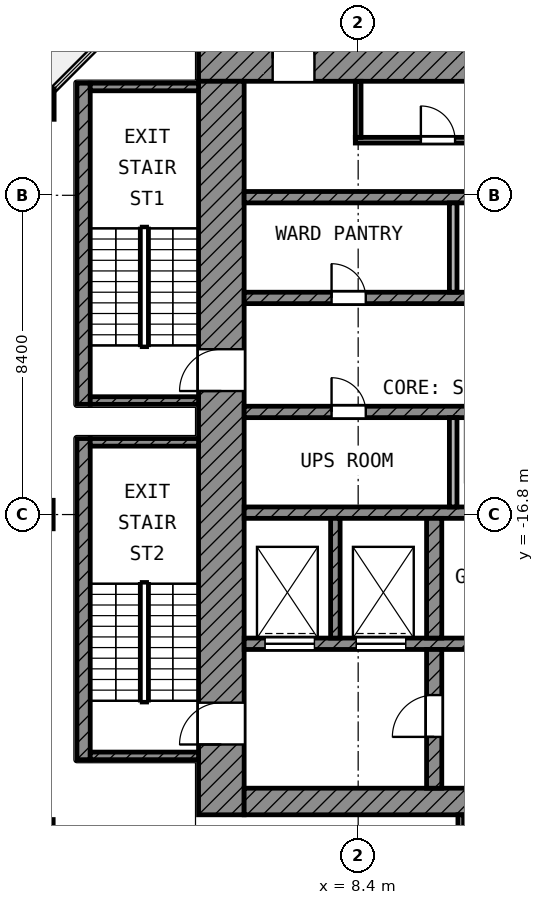
"""IFC4 building model, lengths in metres.
Left out: names, types, materials, properties, quantities, classifications, styles, units other than length and angle.
Written with IfcOpenShell. Run it as: python <this file> out.ifc"""

import sys

from ifc_helpers import new_model, si_unit, direction, frame, frame_2d, origin, origin_2d, place, context, subcontext, project, spatial, rectangle, extrude, element, fill, save


model = new_model("IFC4")
c1 = context("Model", 3, precision=1e-05, world=origin(), true_north=direction((0.0, 1.0)))
c2 = subcontext(c1, "Body", "Model", "MODEL_VIEW")
j1 = project(units=[si_unit("LENGTHUNIT", "METRE"), si_unit("PLANEANGLEUNIT", "RADIAN")], contexts=[c1])
p1 = place(None, origin())
s1 = spatial("IfcSite", under=j1, at=p1, CompositionType="ELEMENT")
p2 = place(p1, origin())
s2 = spatial("IfcBuilding", under=s1, at=p2, CompositionType="ELEMENT")
p3 = place(p2, frame((0.0, 0.0, 294.4)))
s3 = spatial("IfcBuildingStorey", under=s2, at=p3, CompositionType="ELEMENT", Elevation=294.4)
p4 = place(p3, frame((0.0, -6.0, 0.0), z_axis=(0.0, 0.0, 1.0), x_axis=(1.0, 0.0, 0.0)))
e1 = element("IfcColumn", 1, at=p4, inside=s3, PredefinedType="COLUMN", context=c2, shape_type="SweptSolid", body=[
    extrude(rectangle(XDim=0.8, YDim=0.8, at=origin_2d()), origin(), (0.0, 0.0, 1.0), 4.2),
])
for number, where, z_axis, x_axis in (
    (2, (0.0, -16.8, 0.0), (0.0, 0.0, 1.0), (1.0, 0.0, 0.0)),
    (3, (0.0, -25.2, 0.0), (0.0, 0.0, 1.0), (1.0, 0.0, 0.0)),
):
    element("IfcColumn", number, at=place(p3, frame(where, z_axis=z_axis, x_axis=x_axis)), inside=s3, PredefinedType="COLUMN", context=c2, shape_type="SweptSolid", body=[
        extrude(rectangle(XDim=0.75, YDim=0.75, at=origin_2d()), origin(), (0.0, 0.0, 1.0), 4.2),
    ])
p5 = place(p3, frame((4.2, -4.8, 0.0), z_axis=(0.0, 0.0, 1.0), x_axis=(1.0, 0.0, 0.0)))
e4 = element("IfcWall", 4, at=p5, inside=s3, PredefinedType="SHEAR", context=c2, shape_type="SweptSolid", body=[
    extrude(rectangle(XDim=20.5, YDim=1.2, at=frame_2d((10.25, 0.0))), origin(), (0.0, 0.0, 1.0), 3.6),
])
p6 = place(p5, frame((1.95, 0.0, 0.0)))
e5 = element("IfcOpeningElement", 5, at=p6, cuts=e4, PredefinedType="OPENING", context=c2, shape_type="SweptSolid", body=[
    extrude(rectangle(XDim=1.1, YDim=2.1, at=frame_2d((0.55, 1.05))), frame((0.0, 0.61, 0.0), z_axis=(0.0, -1.0, 0.0), x_axis=(1.0, 0.0, 0.0)), (0.0, 0.0, 1.0), 1.22),
])
p7 = place(p5, frame((17.95, 0.0, 0.0)))
e6 = element("IfcOpeningElement", 6, at=p7, cuts=e4, PredefinedType="OPENING", context=c2, shape_type="SweptSolid", body=[
    extrude(rectangle(XDim=1.1, YDim=2.1, at=frame_2d((0.55, 1.05))), frame((0.0, 0.61, 0.0), z_axis=(0.0, -1.0, 0.0), x_axis=(1.0, 0.0, 0.0)), (0.0, 0.0, 1.0), 1.22),
])
p8 = place(p3, frame((4.8, -24.7, 0.0), z_axis=(0.0, 0.0, 1.0), x_axis=(0.0, 1.0, 0.0)))
e7 = element("IfcWall", 7, at=p8, inside=s3, PredefinedType="SHEAR", context=c2, shape_type="SweptSolid", body=[
    extrude(rectangle(XDim=19.3, YDim=1.2, at=frame_2d((9.65, 0.0))), origin(), (0.0, 0.0, 1.0), 3.6),
])
p9 = place(p8, frame((11.15, 0.0, 0.0)))
e8 = element("IfcOpeningElement", 8, at=p9, cuts=e7, PredefinedType="OPENING", context=c2, shape_type="SweptSolid", body=[
    extrude(rectangle(XDim=1.1, YDim=2.1, at=frame_2d((0.55, 1.05))), frame((0.0, 0.61, 0.0), z_axis=(0.0, -1.0, 0.0), x_axis=(1.0, 0.0, 0.0)), (0.0, 0.0, 1.0), 1.22),
])
p10 = place(p8, frame((1.85, 0.0, 0.0)))
e9 = element("IfcOpeningElement", 9, at=p10, cuts=e7, PredefinedType="OPENING", context=c2, shape_type="SweptSolid", body=[
    extrude(rectangle(XDim=1.1, YDim=2.1, at=frame_2d((0.55, 1.05))), frame((0.0, 0.61, 0.0), z_axis=(0.0, -1.0, 0.0), x_axis=(1.0, 0.0, 0.0)), (0.0, 0.0, 1.0), 1.22),
])
p11 = place(p3, frame((5.4, -24.35, 0.0), z_axis=(0.0, 0.0, 1.0), x_axis=(1.0, 0.0, 0.0)))
e10 = element("IfcWall", 10, at=p11, inside=s3, PredefinedType="SHEAR", context=c2, shape_type="SweptSolid", body=[
    extrude(rectangle(XDim=18.6, YDim=0.7, at=frame_2d((9.3, 0.0))), origin(), (0.0, 0.0, 1.0), 3.6),
])
p12 = place(p11, frame((6.3, 0.0, 0.0)))
e11 = element("IfcOpeningElement", 11, at=p12, cuts=e10, PredefinedType="OPENING", context=c2, shape_type="SweptSolid", body=[
    extrude(rectangle(XDim=1.8, YDim=2.1, at=frame_2d((0.9, 1.05))), frame((0.0, 0.36, 0.0), z_axis=(0.0, -1.0, 0.0), x_axis=(1.0, 0.0, 0.0)), (0.0, 0.0, 1.0), 0.72),
])
p13 = place(p3, frame((5.4, -8.45, 0.0), z_axis=(0.0, 0.0, 1.0), x_axis=(1.0, 0.0, 0.0)))
e12 = element("IfcWall", 12, at=p13, inside=s3, PredefinedType="SHEAR", context=c2, shape_type="SweptSolid", body=[
    extrude(rectangle(XDim=16.65, YDim=0.3, at=frame_2d((8.325, 0.0))), origin(), (0.0, 0.0, 1.0), 3.6),
])
p14 = place(p3, frame((5.4, -11.1, 0.0), z_axis=(0.0, 0.0, 1.0), x_axis=(1.0, 0.0, 0.0)))
e13 = element("IfcWall", 13, at=p14, inside=s3, PredefinedType="SHEAR", context=c2, shape_type="SweptSolid", body=[
    extrude(rectangle(XDim=16.65, YDim=0.3, at=frame_2d((8.325, 0.0))), origin(), (0.0, 0.0, 1.0), 3.6),
])
p15 = place(p14, frame((2.3, 0.0, 0.0)))
e14 = element("IfcOpeningElement", 14, at=p15, cuts=e13, PredefinedType="OPENING", context=c2, shape_type="SweptSolid", body=[
    extrude(rectangle(XDim=0.9, YDim=2.1, at=frame_2d((0.45, 1.05))), frame((0.0, 0.16, 0.0), z_axis=(0.0, -1.0, 0.0), x_axis=(1.0, 0.0, 0.0)), (0.0, 0.0, 1.0), 0.32),
])
p16 = place(p14, frame((7.8, 0.0, 0.0)))
e15 = element("IfcOpeningElement", 15, at=p16, cuts=e13, PredefinedType="OPENING", context=c2, shape_type="SweptSolid", body=[
    extrude(rectangle(XDim=0.9, YDim=2.1, at=frame_2d((0.45, 1.05))), frame((0.0, 0.16, 0.0), z_axis=(0.0, -1.0, 0.0), x_axis=(1.0, 0.0, 0.0)), (0.0, 0.0, 1.0), 0.32),
])
p17 = place(p14, frame((13.3, 0.0, 0.0)))
e16 = element("IfcOpeningElement", 16, at=p17, cuts=e13, PredefinedType="OPENING", context=c2, shape_type="SweptSolid", body=[
    extrude(rectangle(XDim=0.9, YDim=2.1, at=frame_2d((0.45, 1.05))), frame((0.0, 0.16, 0.0), z_axis=(0.0, -1.0, 0.0), x_axis=(1.0, 0.0, 0.0)), (0.0, 0.0, 1.0), 0.32),
])
p18 = place(p3, frame((5.4, -14.1, 0.0), z_axis=(0.0, 0.0, 1.0), x_axis=(1.0, 0.0, 0.0)))
e17 = element("IfcWall", 17, at=p18, inside=s3, PredefinedType="SHEAR", context=c2, shape_type="SweptSolid", body=[
    extrude(rectangle(XDim=16.65, YDim=0.3, at=frame_2d((8.325, 0.0))), origin(), (0.0, 0.0, 1.0), 3.6),
])
p19 = place(p18, frame((6.325, 0.0, 0.0)))
e18 = element("IfcOpeningElement", 18, at=p19, cuts=e17, PredefinedType="OPENING", context=c2, shape_type="SweptSolid", body=[
    extrude(rectangle(XDim=1.1, YDim=2.1, at=frame_2d((0.55, 1.05))), frame((0.0, 0.16, 0.0), z_axis=(0.0, -1.0, 0.0), x_axis=(1.0, 0.0, 0.0)), (0.0, 0.0, 1.0), 0.32),
])
p20 = place(p18, frame((9.075, 0.0, 0.0)))
e19 = element("IfcOpeningElement", 19, at=p20, cuts=e17, PredefinedType="OPENING", context=c2, shape_type="SweptSolid", body=[
    extrude(rectangle(XDim=1.1, YDim=2.1, at=frame_2d((0.55, 1.05))), frame((0.0, 0.16, 0.0), z_axis=(0.0, -1.0, 0.0), x_axis=(1.0, 0.0, 0.0)), (0.0, 0.0, 1.0), 0.32),
])
p21 = place(p18, frame((11.825, 0.0, 0.0)))
e20 = element("IfcOpeningElement", 20, at=p21, cuts=e17, PredefinedType="OPENING", context=c2, shape_type="SweptSolid", body=[
    extrude(rectangle(XDim=1.1, YDim=2.1, at=frame_2d((0.55, 1.05))), frame((0.0, 0.16, 0.0), z_axis=(0.0, -1.0, 0.0), x_axis=(1.0, 0.0, 0.0)), (0.0, 0.0, 1.0), 0.32),
])
p22 = place(p18, frame((14.575, 0.0, 0.0)))
e21 = element("IfcOpeningElement", 21, at=p22, cuts=e17, PredefinedType="OPENING", context=c2, shape_type="SweptSolid", body=[
    extrude(rectangle(XDim=1.1, YDim=2.1, at=frame_2d((0.55, 1.05))), frame((0.0, 0.16, 0.0), z_axis=(0.0, -1.0, 0.0), x_axis=(1.0, 0.0, 0.0)), (0.0, 0.0, 1.0), 0.32),
])
p23 = place(p18, frame((2.3, 0.0, 0.0)))
e22 = element("IfcOpeningElement", 22, at=p23, cuts=e17, PredefinedType="OPENING", context=c2, shape_type="SweptSolid", body=[
    extrude(rectangle(XDim=0.9, YDim=2.1, at=frame_2d((0.45, 1.05))), frame((0.0, 0.16, 0.0), z_axis=(0.0, -1.0, 0.0), x_axis=(1.0, 0.0, 0.0)), (0.0, 0.0, 1.0), 0.32),
])
p24 = place(p3, frame((5.4, -16.75, 0.0), z_axis=(0.0, 0.0, 1.0), x_axis=(1.0, 0.0, 0.0)))
e23 = element("IfcWall", 23, at=p24, inside=s3, PredefinedType="SHEAR", context=c2, shape_type="SweptSolid", body=[
    extrude(rectangle(XDim=16.65, YDim=0.3, at=frame_2d((8.325, 0.0))), origin(), (0.0, 0.0, 1.0), 3.6),
])
p25 = place(p3, frame((5.4, -20.2, 0.0), z_axis=(0.0, 0.0, 1.0), x_axis=(1.0, 0.0, 0.0)))
e24 = element("IfcWall", 24, at=p25, inside=s3, PredefinedType="SHEAR", context=c2, shape_type="SweptSolid", body=[
    extrude(rectangle(XDim=14.65, YDim=0.3, at=frame_2d((7.325, 0.0))), origin(), (0.0, 0.0, 1.0), 3.6),
])
p26 = place(p25, frame((10.55, 0.0, 0.0)))
e25 = element("IfcOpeningElement", 25, at=p26, cuts=e24, PredefinedType="OPENING", context=c2, shape_type="SweptSolid", body=[
    extrude(rectangle(XDim=1.3, YDim=2.1, at=frame_2d((0.65, 1.05))), frame((0.0, 0.16, 0.0), z_axis=(0.0, -1.0, 0.0), x_axis=(1.0, 0.0, 0.0)), (0.0, 0.0, 1.0), 0.32),
])
p27 = place(p25, frame((12.95, 0.0, 0.0)))
e26 = element("IfcOpeningElement", 26, at=p27, cuts=e24, PredefinedType="OPENING", context=c2, shape_type="SweptSolid", body=[
    extrude(rectangle(XDim=1.3, YDim=2.1, at=frame_2d((0.65, 1.05))), frame((0.0, 0.16, 0.0), z_axis=(0.0, -1.0, 0.0), x_axis=(1.0, 0.0, 0.0)), (0.0, 0.0, 1.0), 0.32),
])
p28 = place(p25, frame((0.55, 0.0, 0.0)))
e27 = element("IfcOpeningElement", 27, at=p28, cuts=e24, PredefinedType="OPENING", context=c2, shape_type="SweptSolid", body=[
    extrude(rectangle(XDim=1.3, YDim=2.1, at=frame_2d((0.65, 1.05))), frame((0.0, 0.16, 0.0), z_axis=(0.0, -1.0, 0.0), x_axis=(1.0, 0.0, 0.0)), (0.0, 0.0, 1.0), 0.32),
])
p29 = place(p25, frame((2.95, 0.0, 0.0)))
e28 = element("IfcOpeningElement", 28, at=p29, cuts=e24, PredefinedType="OPENING", context=c2, shape_type="SweptSolid", body=[
    extrude(rectangle(XDim=1.3, YDim=2.1, at=frame_2d((0.65, 1.05))), frame((0.0, 0.16, 0.0), z_axis=(0.0, -1.0, 0.0), x_axis=(1.0, 0.0, 0.0)), (0.0, 0.0, 1.0), 0.32),
])
p30 = place(p25, frame((7.15, 0.0, 0.0)))
e29 = element("IfcOpeningElement", 29, at=p30, cuts=e24, PredefinedType="OPENING", context=c2, shape_type="SweptSolid", body=[
    extrude(rectangle(XDim=0.9, YDim=2.1, at=frame_2d((0.45, 1.05))), frame((0.0, 0.16, 0.0), z_axis=(0.0, -1.0, 0.0), x_axis=(1.0, 0.0, 0.0)), (0.0, 0.0, 1.0), 0.32),
])
p31 = place(p3, frame((10.4, -24.0, 0.0), z_axis=(0.0, 0.0, 1.0), x_axis=(0.0, 1.0, 0.0)))
e30 = element("IfcWall", 30, at=p31, inside=s3, PredefinedType="SHEAR", context=c2, shape_type="SweptSolid", body=[
    extrude(rectangle(XDim=3.65, YDim=0.4, at=frame_2d((1.825, 0.0))), origin(), (0.0, 0.0, 1.0), 3.6),
])
p32 = place(p31, frame((1.35, 0.0, 0.0)))
e31 = element("IfcOpeningElement", 31, at=p32, cuts=e30, PredefinedType="OPENING", context=c2, shape_type="SweptSolid", body=[
    extrude(rectangle(XDim=1.1, YDim=2.1, at=frame_2d((0.55, 1.05))), frame((0.0, 0.21, 0.0), z_axis=(0.0, -1.0, 0.0), x_axis=(1.0, 0.0, 0.0)), (0.0, 0.0, 1.0), 0.42),
])
p33 = place(p3, frame((10.4, -20.05, 0.0), z_axis=(0.0, 0.0, 1.0), x_axis=(0.0, 1.0, 0.0)))
e32 = element("IfcWall", 32, at=p33, inside=s3, PredefinedType="SHEAR", context=c2, shape_type="SweptSolid", body=[
    extrude(rectangle(XDim=3.15, YDim=0.4, at=frame_2d((1.575, 0.0))), origin(), (0.0, 0.0, 1.0), 3.6),
])
p34 = place(p3, frame((7.8, -20.05, 0.0), z_axis=(0.0, 0.0, 1.0), x_axis=(0.0, 1.0, 0.0)))
e33 = element("IfcWall", 33, at=p34, inside=s3, PredefinedType="SHEAR", context=c2, shape_type="SweptSolid", body=[
    extrude(rectangle(XDim=3.15, YDim=0.25, at=frame_2d((1.575, 0.0))), origin(), (0.0, 0.0, 1.0), 3.6),
])
p35 = place(p3, frame((10.9, -10.95, 0.0), z_axis=(0.0, 0.0, 1.0), x_axis=(0.0, 1.0, 0.0)))
e34 = element("IfcWall", 34, at=p35, inside=s3, PredefinedType="PARTITIONING", context=c2, shape_type="SweptSolid", body=[
    extrude(rectangle(XDim=2.35, YDim=0.2, at=frame_2d((1.175, 0.0))), origin(), (0.0, 0.0, 1.0), 3.6),
])
p36 = place(p3, frame((10.9, -16.6, 0.0), z_axis=(0.0, 0.0, 1.0), x_axis=(0.0, 1.0, 0.0)))
e35 = element("IfcWall", 35, at=p36, inside=s3, PredefinedType="PARTITIONING", context=c2, shape_type="SweptSolid", body=[
    extrude(rectangle(XDim=2.35, YDim=0.2, at=frame_2d((1.175, 0.0))), origin(), (0.0, 0.0, 1.0), 3.6),
])
p37 = place(p3, frame((8.325, -6.95, 0.0), z_axis=(0.0, 0.0, 1.0), x_axis=(1.0, 0.0, 0.0)))
e36 = element("IfcWall", 36, at=p37, inside=s3, PredefinedType="PARTITIONING", context=c2, shape_type="SweptSolid", body=[
    extrude(rectangle(XDim=12.75, YDim=0.15, at=frame_2d((6.375, 0.0))), origin(), (0.0, 0.0, 1.0), 3.6),
])
p38 = place(p37, frame((1.725, 0.0, 0.0)))
e37 = element("IfcOpeningElement", 37, at=p38, cuts=e36, PredefinedType="OPENING", context=c2, shape_type="SweptSolid", body=[
    extrude(rectangle(XDim=0.9, YDim=2.1, at=frame_2d((0.45, 1.05))), frame((0.0, 0.085, 0.0), z_axis=(0.0, -1.0, 0.0), x_axis=(1.0, 0.0, 0.0)), (0.0, 0.0, 1.0), 0.17),
])
p39 = place(p37, frame((5.925, 0.0, 0.0)))
e38 = element("IfcOpeningElement", 38, at=p39, cuts=e36, PredefinedType="OPENING", context=c2, shape_type="SweptSolid", body=[
    extrude(rectangle(XDim=0.9, YDim=2.1, at=frame_2d((0.45, 1.05))), frame((0.0, 0.085, 0.0), z_axis=(0.0, -1.0, 0.0), x_axis=(1.0, 0.0, 0.0)), (0.0, 0.0, 1.0), 0.17),
])
p40 = place(p37, frame((10.125, 0.0, 0.0)))
e39 = element("IfcOpeningElement", 39, at=p40, cuts=e36, PredefinedType="OPENING", context=c2, shape_type="SweptSolid", body=[
    extrude(rectangle(XDim=0.9, YDim=2.1, at=frame_2d((0.45, 1.05))), frame((0.0, 0.085, 0.0), z_axis=(0.0, -1.0, 0.0), x_axis=(1.0, 0.0, 0.0)), (0.0, 0.0, 1.0), 0.17),
])
p41 = place(p3, frame((8.4, -6.875, 0.0), z_axis=(0.0, 0.0, 1.0), x_axis=(0.0, 1.0, 0.0)))
e40 = element("IfcWall", 40, at=p41, inside=s3, PredefinedType="PARTITIONING", context=c2, shape_type="SweptSolid", body=[
    extrude(rectangle(XDim=1.475, YDim=0.15, at=frame_2d((0.738, 0.0))), origin(), (0.0, 0.0, 1.0), 3.6),
])
p42 = place(p3, frame((1.175, -13.9, 0.0), z_axis=(0.0, 0.0, 1.0), x_axis=(0.0, 1.0, 0.0)))
e41 = element("IfcWall", 41, at=p42, inside=s3, PredefinedType="SHEAR", context=c2, shape_type="SweptSolid", body=[
    extrude(rectangle(XDim=8.45, YDim=0.35, at=frame_2d((4.225, 0.0))), origin(), (0.0, 0.0, 1.0), 3.6),
])
for number, where, z_axis, x_axis in (
    (42, (1.35, -5.55, 0.0), (0.0, 0.0, 1.0), (1.0, 0.0, 0.0)),
    (43, (1.35, -13.8, 0.0), (0.0, 0.0, 1.0), (1.0, 0.0, 0.0)),
):
    element("IfcWall", number, at=place(p3, frame(where, z_axis=z_axis, x_axis=x_axis)), inside=s3, PredefinedType="SHEAR", context=c2, shape_type="SweptSolid", body=[
        extrude(rectangle(XDim=2.85, YDim=0.2, at=frame_2d((1.425, 0.0))), origin(), (0.0, 0.0, 1.0), 3.6),
    ])
p43 = place(p3, frame((1.175, -23.25, 0.0), z_axis=(0.0, 0.0, 1.0), x_axis=(0.0, 1.0, 0.0)))
e44 = element("IfcWall", 44, at=p43, inside=s3, PredefinedType="SHEAR", context=c2, shape_type="SweptSolid", body=[
    extrude(rectangle(XDim=8.45, YDim=0.35, at=frame_2d((4.225, 0.0))), origin(), (0.0, 0.0, 1.0), 3.6),
])
for number, where, z_axis, x_axis in (
    (45, (1.35, -14.9, 0.0), (0.0, 0.0, 1.0), (1.0, 0.0, 0.0)),
    (46, (1.35, -23.15, 0.0), (0.0, 0.0, 1.0), (1.0, 0.0, 0.0)),
):
    element("IfcWall", number, at=place(p3, frame(where, z_axis=z_axis, x_axis=x_axis)), inside=s3, PredefinedType="SHEAR", context=c2, shape_type="SweptSolid", body=[
        extrude(rectangle(XDim=2.85, YDim=0.2, at=frame_2d((1.425, 0.0))), origin(), (0.0, 0.0, 1.0), 3.6),
    ])
p44 = place(p3, frame((11.1, -29.399, 0.0), z_axis=(0.0, 0.0, 1.0), x_axis=(0.0, 1.0, 0.0)))
e47 = element("IfcWall", 47, at=p44, inside=s3, PredefinedType="PARTITIONING", context=c2, shape_type="SweptSolid", body=[
    extrude(rectangle(XDim=4.699, YDim=0.15, at=frame_2d((2.35, 0.0))), origin(), (0.0, 0.0, 1.0), 3.6),
])
p45 = place(p28, origin())
e48 = element("IfcDoor", 48, at=p45, inside=s3, OperationType="DOUBLE_DOOR_SLIDING", PredefinedType="DOOR", context=c2, shape_type="SweptSolid", body=[
    extrude(rectangle(XDim=1.3, YDim=2.1, at=frame_2d((0.65, 1.05))), frame((0.0, 0.025, 0.0), z_axis=(0.0, -1.0, 0.0), x_axis=(1.0, 0.0, 0.0)), (0.0, 0.0, 1.0), 0.05),
])
fill(e27, e48)
p46 = place(p29, origin())
e49 = element("IfcDoor", 49, at=p46, inside=s3, OperationType="DOUBLE_DOOR_SLIDING", PredefinedType="DOOR", context=c2, shape_type="SweptSolid", body=[
    extrude(rectangle(XDim=1.3, YDim=2.1, at=frame_2d((0.65, 1.05))), frame((0.0, 0.025, 0.0), z_axis=(0.0, -1.0, 0.0), x_axis=(1.0, 0.0, 0.0)), (0.0, 0.0, 1.0), 0.05),
])
fill(e28, e49)
p47 = place(p9, origin())
e50 = element("IfcDoor", 50, at=p47, inside=s3, OperationType="SINGLE_SWING_LEFT", PredefinedType="DOOR", context=c2, shape_type="SweptSolid", body=[
    extrude(rectangle(XDim=1.1, YDim=2.1, at=frame_2d((0.55, 1.05))), frame((0.0, 0.025, 0.0), z_axis=(0.0, -1.0, 0.0), x_axis=(1.0, 0.0, 0.0)), (0.0, 0.0, 1.0), 0.05),
])
fill(e8, e50)
p48 = place(p10, origin())
e51 = element("IfcDoor", 51, at=p48, inside=s3, OperationType="SINGLE_SWING_LEFT", PredefinedType="DOOR", context=c2, shape_type="SweptSolid", body=[
    extrude(rectangle(XDim=1.1, YDim=2.1, at=frame_2d((0.55, 1.05))), frame((0.0, 0.025, 0.0), z_axis=(0.0, -1.0, 0.0), x_axis=(1.0, 0.0, 0.0)), (0.0, 0.0, 1.0), 0.05),
])
fill(e9, e51)
p49 = place(p6, origin())
e52 = element("IfcDoor", 52, at=p49, inside=s3, OperationType="SINGLE_SWING_LEFT", PredefinedType="DOOR", context=c2, shape_type="SweptSolid", body=[
    extrude(rectangle(XDim=1.1, YDim=2.1, at=frame_2d((0.55, 1.05))), frame((0.0, 0.025, 0.0), z_axis=(0.0, -1.0, 0.0), x_axis=(1.0, 0.0, 0.0)), (0.0, 0.0, 1.0), 0.05),
])
fill(e5, e52)
p50 = place(p32, origin())
e53 = element("IfcDoor", 53, at=p50, inside=s3, OperationType="SINGLE_SWING_LEFT", PredefinedType="DOOR", context=c2, shape_type="SweptSolid", body=[
    extrude(rectangle(XDim=1.1, YDim=2.1, at=frame_2d((0.55, 1.05))), frame((0.0, 0.025, 0.0), z_axis=(0.0, -1.0, 0.0), x_axis=(1.0, 0.0, 0.0)), (0.0, 0.0, 1.0), 0.05),
])
fill(e31, e53)
p51 = place(p38, origin())
e54 = element("IfcDoor", 54, at=p51, inside=s3, OperationType="SINGLE_SWING_LEFT", PredefinedType="DOOR", context=c2, shape_type="SweptSolid", body=[
    extrude(rectangle(XDim=0.9, YDim=2.1, at=frame_2d((0.45, 1.05))), frame((0.0, 0.025, 0.0), z_axis=(0.0, -1.0, 0.0), x_axis=(1.0, 0.0, 0.0)), (0.0, 0.0, 1.0), 0.05),
])
fill(e37, e54)
p52 = place(p15, origin())
e55 = element("IfcDoor", 55, at=p52, inside=s3, OperationType="SINGLE_SWING_LEFT", PredefinedType="DOOR", context=c2, shape_type="SweptSolid", body=[
    extrude(rectangle(XDim=0.9, YDim=2.1, at=frame_2d((0.45, 1.05))), frame((0.0, 0.025, 0.0), z_axis=(0.0, -1.0, 0.0), x_axis=(1.0, 0.0, 0.0)), (0.0, 0.0, 1.0), 0.05),
])
fill(e14, e55)
p53 = place(p23, origin())
e56 = element("IfcDoor", 56, at=p53, inside=s3, OperationType="SINGLE_SWING_LEFT", PredefinedType="DOOR", context=c2, shape_type="SweptSolid", body=[
    extrude(rectangle(XDim=0.9, YDim=2.1, at=frame_2d((0.45, 1.05))), frame((0.0, 0.025, 0.0), z_axis=(0.0, -1.0, 0.0), x_axis=(1.0, 0.0, 0.0)), (0.0, 0.0, 1.0), 0.05),
])
fill(e22, e56)
save(model, sys.argv[1])
